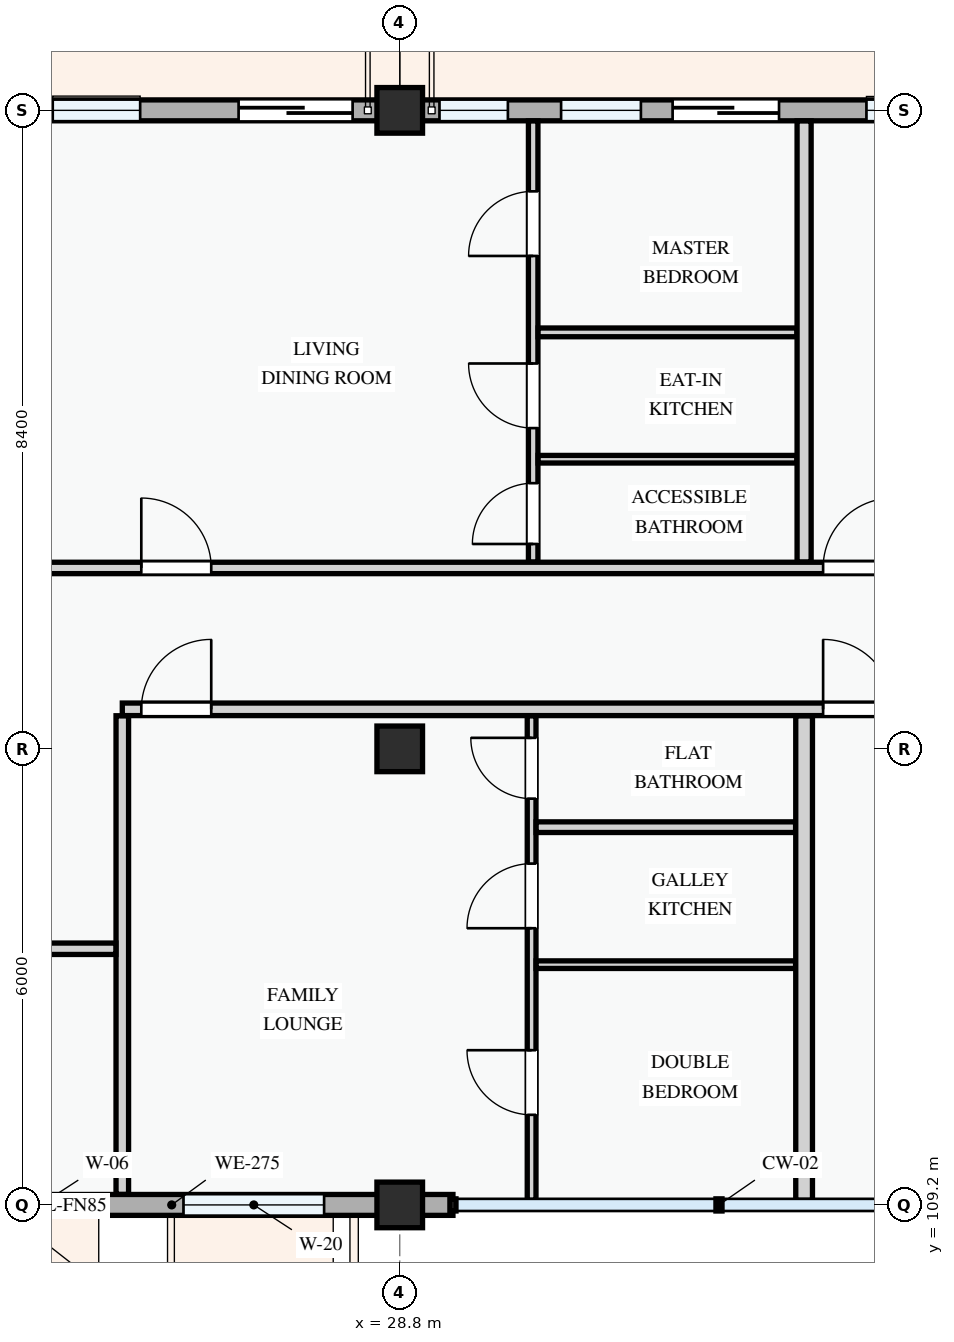
"""IFC4 building model, lengths in metres.
Left out: names, types, materials, properties, quantities, classifications, styles, units other than length and angle.
Written with IfcOpenShell. Run it as: python <this file> out.ifc"""

import sys

from ifc_helpers import new_model, si_unit, direction, frame, frame_2d, origin, origin_2d, place, context, subcontext, project, spatial, rectangle, extrude, element, fill, save


model = new_model("IFC4")
c1 = context("Model", 3, precision=1e-05, world=origin(), true_north=direction((0.0, 1.0)))
c2 = subcontext(c1, "Body", "Model", "MODEL_VIEW")
j1 = project(units=[si_unit("LENGTHUNIT", "METRE"), si_unit("PLANEANGLEUNIT", "RADIAN")], contexts=[c1])
p1 = place(None, origin())
s1 = spatial("IfcSite", under=j1, at=p1, CompositionType="ELEMENT")
p2 = place(p1, origin())
s2 = spatial("IfcBuilding", under=s1, at=p2, CompositionType="ELEMENT")
p3 = place(p2, frame((0.0, 0.0, 31.2)))
s3 = spatial("IfcBuildingStorey", under=s2, at=p3, CompositionType="ELEMENT", Elevation=31.2)
for number, where, z_axis, x_axis in (
    (1, (28.8, 109.2, 0.0), (0.0, 0.0, 1.0), (1.0, 0.0, 0.0)),
    (2, (28.8, 115.2, 0.0), (0.0, 0.0, 1.0), (1.0, 0.0, 0.0)),
    (3, (28.8, 123.6, 0.0), (0.0, 0.0, 1.0), (1.0, 0.0, 0.0)),
):
    element("IfcColumn", number, at=place(p3, frame(where, z_axis=z_axis, x_axis=x_axis)), inside=s3, PredefinedType="COLUMN", context=c2, shape_type="SweptSolid", body=[
        extrude(rectangle(XDim=0.6, YDim=0.6, at=origin_2d()), origin(), (0.0, 0.0, 1.0), 3.3),
    ])
p4 = place(p3, frame((22.8, 109.2, 0.0), z_axis=(0.0, 0.0, 1.0), x_axis=(1.0, 0.0, 0.0)))
e4 = element("IfcWall", 4, at=p4, inside=s3, PredefinedType="STANDARD", context=c2, shape_type="SweptSolid", body=[
    extrude(rectangle(XDim=6.0, YDim=0.275, at=frame_2d((3.0, 0.0))), origin(), (0.0, 0.0, 1.0), 2.525),
])
p5 = place(p4, frame((0.62, 0.0, 0.78)))
e5 = element("IfcOpeningElement", 5, at=p5, cuts=e4, PredefinedType="OPENING", context=c2, shape_type="SweptSolid", body=[
    extrude(rectangle(XDim=1.3, YDim=1.4, at=frame_2d((0.65, 0.7))), frame((0.0, 0.147, 0.0), z_axis=(0.0, -1.0, 0.0), x_axis=(1.0, 0.0, 0.0)), (0.0, 0.0, 1.0), 0.295),
])
p6 = place(p4, frame((3.155, 0.0, 0.78)))
e6 = element("IfcOpeningElement", 6, at=p6, cuts=e4, PredefinedType="OPENING", context=c2, shape_type="SweptSolid", body=[
    extrude(rectangle(XDim=1.85, YDim=1.6, at=frame_2d((0.925, 0.8))), frame((0.0, 0.147, 0.0), z_axis=(0.0, -1.0, 0.0), x_axis=(1.0, 0.0, 0.0)), (0.0, 0.0, 1.0), 0.295),
])
p7 = place(p3, frame((28.8, 109.2, 0.0), z_axis=(0.0, 0.0, 1.0), x_axis=(1.0, 0.0, 0.0)))
e7 = element("IfcWall", 7, at=p7, inside=s3, PredefinedType="STANDARD", context=c2, shape_type="SweptSolid", body=[
    extrude(rectangle(XDim=0.7, YDim=0.275, at=frame_2d((0.35, 0.0))), origin(), (0.0, 0.0, 1.0), 2.375),
])
p8 = place(p3, frame((37.2, 123.6, 0.0), z_axis=(0.0, 0.0, 1.0), x_axis=(-1.0, 0.0, 0.0)))
e8 = element("IfcWall", 8, at=p8, inside=s3, PredefinedType="STANDARD", context=c2, shape_type="SweptSolid", body=[
    extrude(rectangle(XDim=8.4, YDim=0.275, at=frame_2d((4.2, 0.0))), origin(), (0.0, 0.0, 1.0), 2.375),
])
p9 = place(p8, frame((3.41, 0.0, 0.0)))
e9 = element("IfcOpeningElement", 9, at=p9, cuts=e8, PredefinedType="OPENING", context=c2, shape_type="SweptSolid", body=[
    extrude(rectangle(XDim=1.4, YDim=2.2, at=frame_2d((0.7, 1.1))), frame((0.0, 0.147, 0.0), z_axis=(0.0, -1.0, 0.0), x_axis=(1.0, 0.0, 0.0)), (0.0, 0.0, 1.0), 0.295),
])
p10 = place(p8, frame((1.01, 0.0, 0.78)))
e10 = element("IfcOpeningElement", 10, at=p10, cuts=e8, PredefinedType="OPENING", context=c2, shape_type="SweptSolid", body=[
    extrude(rectangle(XDim=1.25, YDim=1.3, at=frame_2d((0.625, 0.65))), frame((0.0, 0.147, 0.0), z_axis=(0.0, -1.0, 0.0), x_axis=(1.0, 0.0, 0.0)), (0.0, 0.0, 1.0), 0.295),
])
p11 = place(p8, frame((5.227, 0.0, 0.78)))
e11 = element("IfcOpeningElement", 11, at=p11, cuts=e8, PredefinedType="OPENING", context=c2, shape_type="SweptSolid", body=[
    extrude(rectangle(XDim=1.05, YDim=1.2, at=frame_2d((0.525, 0.6))), frame((0.0, 0.147, 0.0), z_axis=(0.0, -1.0, 0.0), x_axis=(1.0, 0.0, 0.0)), (0.0, 0.0, 1.0), 0.295),
])
p12 = place(p8, frame((6.977, 0.0, 0.78)))
e12 = element("IfcOpeningElement", 12, at=p12, cuts=e8, PredefinedType="OPENING", context=c2, shape_type="SweptSolid", body=[
    extrude(rectangle(XDim=0.9, YDim=1.2, at=frame_2d((0.45, 0.6))), frame((0.0, 0.147, 0.0), z_axis=(0.0, -1.0, 0.0), x_axis=(1.0, 0.0, 0.0)), (0.0, 0.0, 1.0), 0.295),
])
p13 = place(p3, frame((28.8, 123.6, 0.0), z_axis=(0.0, 0.0, 1.0), x_axis=(-1.0, 0.0, 0.0)))
e13 = element("IfcWall", 13, at=p13, inside=s3, PredefinedType="STANDARD", context=c2, shape_type="SweptSolid", body=[
    extrude(rectangle(XDim=6.0, YDim=0.275, at=frame_2d((3.0, 0.0))), origin(), (0.0, 0.0, 1.0), 2.525),
])
p14 = place(p13, frame((0.62, 0.0, 0.0)))
e14 = element("IfcOpeningElement", 14, at=p14, cuts=e13, PredefinedType="OPENING", context=c2, shape_type="SweptSolid", body=[
    extrude(rectangle(XDim=1.5, YDim=2.2, at=frame_2d((0.75, 1.1))), frame((0.0, 0.147, 0.0), z_axis=(0.0, -1.0, 0.0), x_axis=(1.0, 0.0, 0.0)), (0.0, 0.0, 1.0), 0.295),
])
p15 = place(p13, frame((3.415, 0.0, 0.78)))
e15 = element("IfcOpeningElement", 15, at=p15, cuts=e13, PredefinedType="OPENING", context=c2, shape_type="SweptSolid", body=[
    extrude(rectangle(XDim=1.15, YDim=1.25, at=frame_2d((0.575, 0.625))), frame((0.0, 0.147, 0.0), z_axis=(0.0, -1.0, 0.0), x_axis=(1.0, 0.0, 0.0)), (0.0, 0.0, 1.0), 0.295),
])
p16 = place(p3, frame((25.15, 109.34, 0.0), z_axis=(0.0, 0.0, 1.0), x_axis=(0.0, 1.0, 0.0)))
e16 = element("IfcWall", 16, at=p16, inside=s3, PredefinedType="PARTITIONING", context=c2, shape_type="SweptSolid", body=[
    extrude(rectangle(XDim=6.296, YDim=0.165, at=frame_2d((3.148, 0.0))), origin(), (0.0, 0.0, 1.0), 3.0),
])
p17 = place(p3, frame((22.66, 112.57, 0.0), z_axis=(0.0, 0.0, 1.0), x_axis=(1.0, 0.0, 0.0)))
e17 = element("IfcWall", 17, at=p17, inside=s3, PredefinedType="PARTITIONING", context=c2, shape_type="SweptSolid", body=[
    extrude(rectangle(XDim=2.406, YDim=0.15, at=frame_2d((1.203, 0.0))), origin(), (0.0, 0.0, 1.0), 3.0),
])
p18 = place(p3, frame((30.535, 109.26, 0.0), z_axis=(0.0, 0.0, 1.0), x_axis=(0.0, 1.0, 0.0)))
e18 = element("IfcWall", 18, at=p18, inside=s3, PredefinedType="PARTITIONING", context=c2, shape_type="SweptSolid", body=[
    extrude(rectangle(XDim=6.375, YDim=0.115, at=frame_2d((3.188, 0.0))), origin(), (0.0, 0.0, 1.0), 3.0),
])
p19 = place(p18, frame((1.125, 0.0, 0.0)))
e19 = element("IfcOpeningElement", 19, at=p19, cuts=e18, PredefinedType="OPENING", context=c2, shape_type="SweptSolid", body=[
    extrude(rectangle(XDim=0.85, YDim=2.1, at=frame_2d((0.425, 1.05))), frame((0.0, 0.067, 0.0), z_axis=(0.0, -1.0, 0.0), x_axis=(1.0, 0.0, 0.0)), (0.0, 0.0, 1.0), 0.135),
])
p20 = place(p18, frame((3.58, 0.0, 0.0)))
e20 = element("IfcOpeningElement", 20, at=p20, cuts=e18, PredefinedType="OPENING", context=c2, shape_type="SweptSolid", body=[
    extrude(rectangle(XDim=0.85, YDim=2.1, at=frame_2d((0.425, 1.05))), frame((0.0, 0.067, 0.0), z_axis=(0.0, -1.0, 0.0), x_axis=(1.0, 0.0, 0.0)), (0.0, 0.0, 1.0), 0.135),
])
p21 = place(p18, frame((5.285, 0.0, 0.0)))
e21 = element("IfcOpeningElement", 21, at=p21, cuts=e18, PredefinedType="OPENING", context=c2, shape_type="SweptSolid", body=[
    extrude(rectangle(XDim=0.8, YDim=2.1, at=frame_2d((0.4, 1.05))), frame((0.0, 0.067, 0.0), z_axis=(0.0, -1.0, 0.0), x_axis=(1.0, 0.0, 0.0)), (0.0, 0.0, 1.0), 0.135),
])
p22 = place(p3, frame((30.594, 112.361, 0.0), z_axis=(0.0, 0.0, 1.0), x_axis=(1.0, 0.0, 0.0)))
e22 = element("IfcWall", 22, at=p22, inside=s3, PredefinedType="PARTITIONING", context=c2, shape_type="SweptSolid", body=[
    extrude(rectangle(XDim=3.414, YDim=0.1, at=frame_2d((1.707, 0.0))), origin(), (0.0, 0.0, 1.0), 3.0),
])
p23 = place(p3, frame((30.594, 114.17, 0.0), z_axis=(0.0, 0.0, 1.0), x_axis=(1.0, 0.0, 0.0)))
e23 = element("IfcWall", 23, at=p23, inside=s3, PredefinedType="PARTITIONING", context=c2, shape_type="SweptSolid", body=[
    extrude(rectangle(XDim=3.414, YDim=0.14, at=frame_2d((1.707, 0.0))), origin(), (0.0, 0.0, 1.0), 3.0),
])
p24 = place(p3, frame((30.556, 117.657, 0.0), z_axis=(0.0, 0.0, 1.0), x_axis=(0.0, 1.0, 0.0)))
e24 = element("IfcWall", 24, at=p24, inside=s3, PredefinedType="PARTITIONING", context=c2, shape_type="SweptSolid", body=[
    extrude(rectangle(XDim=5.803, YDim=0.125, at=frame_2d((2.902, 0.0))), origin(), (0.0, 0.0, 1.0), 3.0),
])
p25 = place(p24, frame((0.238, 0.0, 0.0)))
e25 = element("IfcOpeningElement", 25, at=p25, cuts=e24, PredefinedType="OPENING", context=c2, shape_type="SweptSolid", body=[
    extrude(rectangle(XDim=0.8, YDim=2.1, at=frame_2d((0.4, 1.05))), frame((0.0, 0.073, 0.0), z_axis=(0.0, -1.0, 0.0), x_axis=(1.0, 0.0, 0.0)), (0.0, 0.0, 1.0), 0.145),
])
p26 = place(p24, frame((1.763, 0.0, 0.0)))
e26 = element("IfcOpeningElement", 26, at=p26, cuts=e24, PredefinedType="OPENING", context=c2, shape_type="SweptSolid", body=[
    extrude(rectangle(XDim=0.85, YDim=2.1, at=frame_2d((0.425, 1.05))), frame((0.0, 0.073, 0.0), z_axis=(0.0, -1.0, 0.0), x_axis=(1.0, 0.0, 0.0)), (0.0, 0.0, 1.0), 0.145),
])
p27 = place(p24, frame((4.028, 0.0, 0.0)))
e27 = element("IfcOpeningElement", 27, at=p27, cuts=e24, PredefinedType="OPENING", context=c2, shape_type="SweptSolid", body=[
    extrude(rectangle(XDim=0.85, YDim=2.1, at=frame_2d((0.425, 1.05))), frame((0.0, 0.073, 0.0), z_axis=(0.0, -1.0, 0.0), x_axis=(1.0, 0.0, 0.0)), (0.0, 0.0, 1.0), 0.145),
])
p28 = place(p3, frame((30.62, 120.679, 0.0), z_axis=(0.0, 0.0, 1.0), x_axis=(1.0, 0.0, 0.0)))
e28 = element("IfcWall", 28, at=p28, inside=s3, PredefinedType="PARTITIONING", context=c2, shape_type="SweptSolid", body=[
    extrude(rectangle(XDim=3.405, YDim=0.115, at=frame_2d((1.703, 0.0))), origin(), (0.0, 0.0, 1.0), 3.0),
])
p29 = place(p3, frame((30.62, 119.01, 0.0), z_axis=(0.0, 0.0, 1.0), x_axis=(1.0, 0.0, 0.0)))
e29 = element("IfcWall", 29, at=p29, inside=s3, PredefinedType="PARTITIONING", context=c2, shape_type="SweptSolid", body=[
    extrude(rectangle(XDim=3.405, YDim=0.1, at=frame_2d((1.703, 0.0))), origin(), (0.0, 0.0, 1.0), 3.0),
])
p30 = place(p3, frame((34.12, 109.26, 0.0), z_axis=(0.0, 0.0, 1.0), x_axis=(0.0, 1.0, 0.0)))
e30 = element("IfcWall", 30, at=p30, inside=s3, PredefinedType="PARTITIONING", context=c2, shape_type="SweptSolid", body=[
    extrude(rectangle(XDim=6.375, YDim=0.22, at=frame_2d((3.188, 0.0))), origin(), (0.0, 0.0, 1.0), 3.0),
])
p31 = place(p3, frame((34.12, 117.657, 0.0), z_axis=(0.0, 0.0, 1.0), x_axis=(0.0, 1.0, 0.0)))
e31 = element("IfcWall", 31, at=p31, inside=s3, PredefinedType="PARTITIONING", context=c2, shape_type="SweptSolid", body=[
    extrude(rectangle(XDim=5.803, YDim=0.185, at=frame_2d((2.902, 0.0))), origin(), (0.0, 0.0, 1.0), 3.0),
])
p32 = place(p3, frame((25.15, 115.72, 0.0), z_axis=(0.0, 0.0, 1.0), x_axis=(1.0, 0.0, 0.0)))
e32 = element("IfcWall", 32, at=p32, inside=s3, PredefinedType="PARTITIONING", context=c2, shape_type="SweptSolid", body=[
    extrude(rectangle(XDim=26.311, YDim=0.165, at=frame_2d((13.155, 0.0))), origin(), (0.0, 0.0, 1.0), 3.0),
])
p33 = place(p32, frame((0.25, 0.0, 0.0)))
e33 = element("IfcOpeningElement", 33, at=p33, cuts=e32, PredefinedType="OPENING", context=c2, shape_type="SweptSolid", body=[
    extrude(rectangle(XDim=0.92, YDim=2.1, at=frame_2d((0.46, 1.05))), frame((0.0, 0.093, 0.0), z_axis=(0.0, -1.0, 0.0), x_axis=(1.0, 0.0, 0.0)), (0.0, 0.0, 1.0), 0.185),
])
p34 = place(p32, frame((9.22, 0.0, 0.0)))
e34 = element("IfcOpeningElement", 34, at=p34, cuts=e32, PredefinedType="OPENING", context=c2, shape_type="SweptSolid", body=[
    extrude(rectangle(XDim=0.92, YDim=2.1, at=frame_2d((0.46, 1.05))), frame((0.0, 0.093, 0.0), z_axis=(0.0, -1.0, 0.0), x_axis=(1.0, 0.0, 0.0)), (0.0, 0.0, 1.0), 0.185),
])
p35 = place(p32, frame((20.11, 0.0, 0.0)))
e35 = element("IfcOpeningElement", 35, at=p35, cuts=e32, PredefinedType="OPENING", context=c2, shape_type="SweptSolid", body=[
    extrude(rectangle(XDim=0.96, YDim=2.12, at=frame_2d((0.48, 1.06))), frame((0.0, 0.093, 0.0), z_axis=(0.0, -1.0, 0.0), x_axis=(1.0, 0.0, 0.0)), (0.0, 0.0, 1.0), 0.185),
])
p36 = place(p3, frame((22.66, 117.58, 0.0), z_axis=(0.0, 0.0, 1.0), x_axis=(1.0, 0.0, 0.0)))
e36 = element("IfcWall", 36, at=p36, inside=s3, PredefinedType="PARTITIONING", context=c2, shape_type="SweptSolid", body=[
    extrude(rectangle(XDim=28.88, YDim=0.15, at=frame_2d((14.44, 0.0))), origin(), (0.0, 0.0, 1.0), 3.0),
])
p37 = place(p36, frame((2.74, 0.0, 0.0)))
e37 = element("IfcOpeningElement", 37, at=p37, cuts=e36, PredefinedType="OPENING", context=c2, shape_type="SweptSolid", body=[
    extrude(rectangle(XDim=0.92, YDim=2.1, at=frame_2d((0.46, 1.05))), frame((0.0, 0.085, 0.0), z_axis=(0.0, -1.0, 0.0), x_axis=(1.0, 0.0, 0.0)), (0.0, 0.0, 1.0), 0.17),
])
p38 = place(p36, frame((11.71, 0.0, 0.0)))
e38 = element("IfcOpeningElement", 38, at=p38, cuts=e36, PredefinedType="OPENING", context=c2, shape_type="SweptSolid", body=[
    extrude(rectangle(XDim=0.92, YDim=2.1, at=frame_2d((0.46, 1.05))), frame((0.0, 0.085, 0.0), z_axis=(0.0, -1.0, 0.0), x_axis=(1.0, 0.0, 0.0)), (0.0, 0.0, 1.0), 0.17),
])
p39 = place(p36, frame((22.397, 0.0, 0.0)))
e39 = element("IfcOpeningElement", 39, at=p39, cuts=e36, PredefinedType="OPENING", context=c2, shape_type="SweptSolid", body=[
    extrude(rectangle(XDim=0.92, YDim=2.1, at=frame_2d((0.46, 1.05))), frame((0.0, 0.085, 0.0), z_axis=(0.0, -1.0, 0.0), x_axis=(1.0, 0.0, 0.0)), (0.0, 0.0, 1.0), 0.17),
])
p40 = place(p5, origin())
e40 = element("IfcWindow", 40, at=p40, inside=s3, PartitioningType="SINGLE_PANEL", PredefinedType="WINDOW", context=c2, shape_type="SweptSolid", body=[
    extrude(rectangle(XDim=1.3, YDim=1.4, at=frame_2d((0.65, 0.7))), frame((0.0, 0.03, 0.0), z_axis=(0.0, -1.0, 0.0), x_axis=(1.0, 0.0, 0.0)), (0.0, 0.0, 1.0), 0.06),
])
fill(e5, e40)
p41 = place(p6, origin())
e41 = element("IfcWindow", 41, at=p41, inside=s3, PartitioningType="DOUBLE_PANEL_VERTICAL", PredefinedType="WINDOW", context=c2, shape_type="SweptSolid", body=[
    extrude(rectangle(XDim=1.85, YDim=1.6, at=frame_2d((0.925, 0.8))), frame((0.0, 0.03, 0.0), z_axis=(0.0, -1.0, 0.0), x_axis=(1.0, 0.0, 0.0)), (0.0, 0.0, 1.0), 0.06),
])
fill(e6, e41)
p42 = place(p9, frame((1.4, 0.0, 0.0), z_axis=(0.0, 0.0, 1.0), x_axis=(-1.0, 0.0, 0.0)))
e42 = element("IfcDoor", 42, at=p42, inside=s3, OperationType="SLIDING_TO_LEFT", PredefinedType="DOOR", context=c2, shape_type="SweptSolid", body=[
    extrude(rectangle(XDim=1.4, YDim=2.2, at=frame_2d((0.7, 1.1))), frame((0.0, 0.025, 0.0), z_axis=(0.0, -1.0, 0.0), x_axis=(1.0, 0.0, 0.0)), (0.0, 0.0, 1.0), 0.05),
])
fill(e9, e42)
p43 = place(p10, origin())
e43 = element("IfcWindow", 43, at=p43, inside=s3, PartitioningType="SINGLE_PANEL", PredefinedType="WINDOW", context=c2, shape_type="SweptSolid", body=[
    extrude(rectangle(XDim=1.25, YDim=1.3, at=frame_2d((0.625, 0.65))), frame((0.0, 0.03, 0.0), z_axis=(0.0, -1.0, 0.0), x_axis=(1.0, 0.0, 0.0)), (0.0, 0.0, 1.0), 0.06),
])
fill(e10, e43)
p44 = place(p11, origin())
e44 = element("IfcWindow", 44, at=p44, inside=s3, PartitioningType="SINGLE_PANEL", PredefinedType="WINDOW", context=c2, shape_type="SweptSolid", body=[
    extrude(rectangle(XDim=1.05, YDim=1.2, at=frame_2d((0.525, 0.6))), frame((0.0, 0.03, 0.0), z_axis=(0.0, -1.0, 0.0), x_axis=(1.0, 0.0, 0.0)), (0.0, 0.0, 1.0), 0.06),
])
fill(e11, e44)
p45 = place(p12, origin())
e45 = element("IfcWindow", 45, at=p45, inside=s3, PartitioningType="SINGLE_PANEL", PredefinedType="WINDOW", context=c2, shape_type="SweptSolid", body=[
    extrude(rectangle(XDim=0.9, YDim=1.2, at=frame_2d((0.45, 0.6))), frame((0.0, 0.03, 0.0), z_axis=(0.0, -1.0, 0.0), x_axis=(1.0, 0.0, 0.0)), (0.0, 0.0, 1.0), 0.06),
])
fill(e12, e45)
p46 = place(p14, frame((1.5, 0.0, 0.0), z_axis=(0.0, 0.0, 1.0), x_axis=(-1.0, 0.0, 0.0)))
e46 = element("IfcDoor", 46, at=p46, inside=s3, OperationType="SLIDING_TO_RIGHT", PredefinedType="DOOR", context=c2, shape_type="SweptSolid", body=[
    extrude(rectangle(XDim=1.5, YDim=2.2, at=frame_2d((0.75, 1.1))), frame((0.0, 0.025, 0.0), z_axis=(0.0, -1.0, 0.0), x_axis=(1.0, 0.0, 0.0)), (0.0, 0.0, 1.0), 0.05),
])
fill(e14, e46)
p47 = place(p15, origin())
e47 = element("IfcWindow", 47, at=p47, inside=s3, PartitioningType="SINGLE_PANEL", PredefinedType="WINDOW", context=c2, shape_type="SweptSolid", body=[
    extrude(rectangle(XDim=1.15, YDim=1.25, at=frame_2d((0.575, 0.625))), frame((0.0, 0.03, 0.0), z_axis=(0.0, -1.0, 0.0), x_axis=(1.0, 0.0, 0.0)), (0.0, 0.0, 1.0), 0.06),
])
fill(e15, e47)
p48 = place(p19, origin())
e48 = element("IfcDoor", 48, at=p48, inside=s3, OperationType="SINGLE_SWING_RIGHT", PredefinedType="DOOR", context=c2, shape_type="SweptSolid", body=[
    extrude(rectangle(XDim=0.85, YDim=2.1, at=frame_2d((0.425, 1.05))), frame((0.0, 0.025, 0.0), z_axis=(0.0, -1.0, 0.0), x_axis=(1.0, 0.0, 0.0)), (0.0, 0.0, 1.0), 0.05),
])
fill(e19, e48)
p49 = place(p20, origin())
e49 = element("IfcDoor", 49, at=p49, inside=s3, OperationType="SINGLE_SWING_LEFT", PredefinedType="DOOR", context=c2, shape_type="SweptSolid", body=[
    extrude(rectangle(XDim=0.85, YDim=2.1, at=frame_2d((0.425, 1.05))), frame((0.0, 0.025, 0.0), z_axis=(0.0, -1.0, 0.0), x_axis=(1.0, 0.0, 0.0)), (0.0, 0.0, 1.0), 0.05),
])
fill(e20, e49)
p50 = place(p21, origin())
e50 = element("IfcDoor", 50, at=p50, inside=s3, OperationType="SINGLE_SWING_RIGHT", PredefinedType="DOOR", context=c2, shape_type="SweptSolid", body=[
    extrude(rectangle(XDim=0.8, YDim=2.1, at=frame_2d((0.4, 1.05))), frame((0.0, 0.025, 0.0), z_axis=(0.0, -1.0, 0.0), x_axis=(1.0, 0.0, 0.0)), (0.0, 0.0, 1.0), 0.05),
])
fill(e21, e50)
p51 = place(p25, origin())
e51 = element("IfcDoor", 51, at=p51, inside=s3, OperationType="SINGLE_SWING_LEFT", PredefinedType="DOOR", context=c2, shape_type="SweptSolid", body=[
    extrude(rectangle(XDim=0.8, YDim=2.1, at=frame_2d((0.4, 1.05))), frame((0.0, 0.025, 0.0), z_axis=(0.0, -1.0, 0.0), x_axis=(1.0, 0.0, 0.0)), (0.0, 0.0, 1.0), 0.05),
])
fill(e25, e51)
p52 = place(p26, origin())
e52 = element("IfcDoor", 52, at=p52, inside=s3, OperationType="SINGLE_SWING_RIGHT", PredefinedType="DOOR", context=c2, shape_type="SweptSolid", body=[
    extrude(rectangle(XDim=0.85, YDim=2.1, at=frame_2d((0.425, 1.05))), frame((0.0, 0.025, 0.0), z_axis=(0.0, -1.0, 0.0), x_axis=(1.0, 0.0, 0.0)), (0.0, 0.0, 1.0), 0.05),
])
fill(e26, e52)
p53 = place(p27, origin())
e53 = element("IfcDoor", 53, at=p53, inside=s3, OperationType="SINGLE_SWING_LEFT", PredefinedType="DOOR", context=c2, shape_type="SweptSolid", body=[
    extrude(rectangle(XDim=0.85, YDim=2.1, at=frame_2d((0.425, 1.05))), frame((0.0, 0.025, 0.0), z_axis=(0.0, -1.0, 0.0), x_axis=(1.0, 0.0, 0.0)), (0.0, 0.0, 1.0), 0.05),
])
fill(e27, e53)
p54 = place(p33, origin())
e54 = element("IfcDoor", 54, at=p54, inside=s3, OperationType="SINGLE_SWING_RIGHT", PredefinedType="DOOR", context=c2, shape_type="SweptSolid", body=[
    extrude(rectangle(XDim=0.92, YDim=2.1, at=frame_2d((0.46, 1.05))), frame((0.0, 0.025, 0.0), z_axis=(0.0, -1.0, 0.0), x_axis=(1.0, 0.0, 0.0)), (0.0, 0.0, 1.0), 0.05),
])
fill(e33, e54)
p55 = place(p34, origin())
e55 = element("IfcDoor", 55, at=p55, inside=s3, OperationType="SINGLE_SWING_LEFT", PredefinedType="DOOR", context=c2, shape_type="SweptSolid", body=[
    extrude(rectangle(XDim=0.92, YDim=2.1, at=frame_2d((0.46, 1.05))), frame((0.0, 0.025, 0.0), z_axis=(0.0, -1.0, 0.0), x_axis=(1.0, 0.0, 0.0)), (0.0, 0.0, 1.0), 0.05),
])
fill(e34, e55)
p56 = place(p37, origin())
e56 = element("IfcDoor", 56, at=p56, inside=s3, OperationType="SINGLE_SWING_LEFT", PredefinedType="DOOR", context=c2, shape_type="SweptSolid", body=[
    extrude(rectangle(XDim=0.92, YDim=2.1, at=frame_2d((0.46, 1.05))), frame((0.0, 0.025, 0.0), z_axis=(0.0, -1.0, 0.0), x_axis=(1.0, 0.0, 0.0)), (0.0, 0.0, 1.0), 0.05),
])
fill(e37, e56)
p57 = place(p38, origin())
e57 = element("IfcDoor", 57, at=p57, inside=s3, OperationType="SINGLE_SWING_RIGHT", PredefinedType="DOOR", context=c2, shape_type="SweptSolid", body=[
    extrude(rectangle(XDim=0.92, YDim=2.1, at=frame_2d((0.46, 1.05))), frame((0.0, 0.025, 0.0), z_axis=(0.0, -1.0, 0.0), x_axis=(1.0, 0.0, 0.0)), (0.0, 0.0, 1.0), 0.05),
])
fill(e38, e57)
save(model, sys.argv[1])
